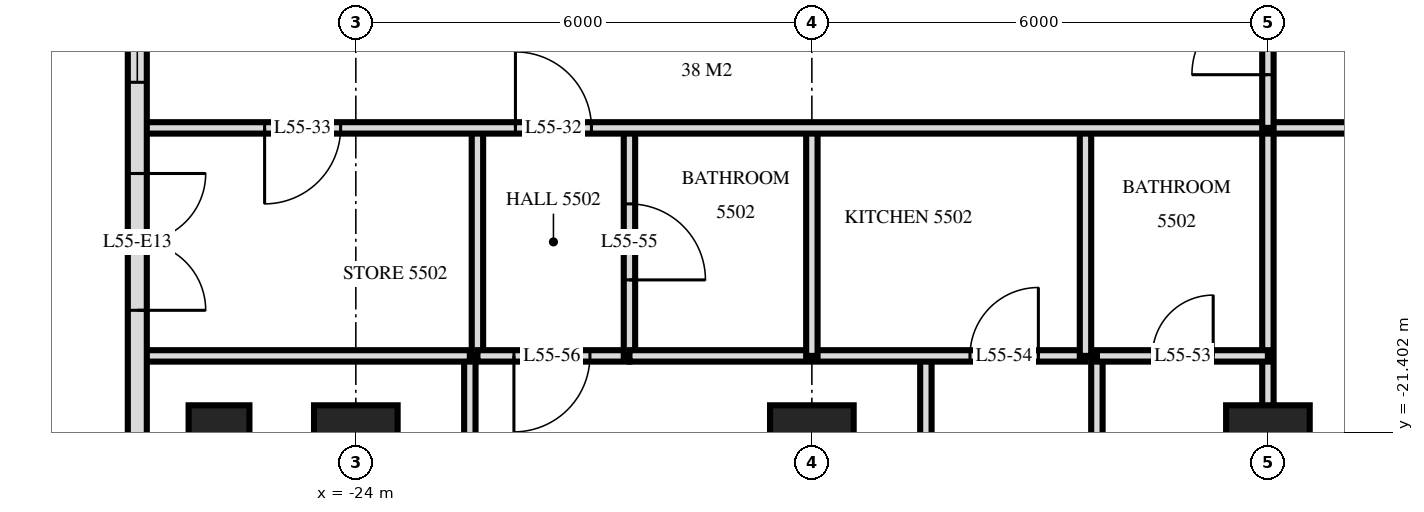
"""IFC4 building model, lengths in metres.
Left out: names, types, materials, properties, quantities, classifications, styles, units other than length and angle.
Written with IfcOpenShell. Run it as: python <this file> out.ifc"""

import sys

from ifc_helpers import new_model, si_unit, direction, frame, frame_2d, origin, origin_2d, place, context, subcontext, project, spatial, rectangle, extrude, element, fill, save


model = new_model("IFC4")
c1 = context("Model", 3, precision=1e-05, world=origin(), true_north=direction((0.0, 1.0)))
c2 = subcontext(c1, "Body", "Model", "MODEL_VIEW")
j1 = project(units=[si_unit("LENGTHUNIT", "METRE"), si_unit("PLANEANGLEUNIT", "RADIAN")], contexts=[c1])
p1 = place(None, origin())
s1 = spatial("IfcSite", under=j1, at=p1, CompositionType="ELEMENT")
p2 = place(p1, origin())
s2 = spatial("IfcBuilding", under=s1, at=p2, CompositionType="ELEMENT")
p3 = place(p2, frame((0.0, 0.0, 211.6)))
s3 = spatial("IfcBuildingStorey", under=s2, at=p3, CompositionType="ELEMENT", Elevation=211.6)
p4 = place(p3, frame((-25.8, -21.6, 0.0), z_axis=(0.0, 0.0, 1.0), x_axis=(0.0, 1.0, 0.0)))
e1 = element("IfcColumn", 1, at=p4, inside=s3, PredefinedType="COLUMN", context=c2, shape_type="SweptSolid", body=[
    extrude(rectangle(XDim=1.1, YDim=0.8, at=origin_2d()), origin(), (0.0, 0.0, 1.0), 3.5),
])
for number, where, z_axis, x_axis in (
    (2, (-24.0, -21.6, 0.0), (0.0, 0.0, 1.0), (1.0, 0.0, 0.0)),
    (3, (-18.0, -21.6, 0.0), (0.0, 0.0, 1.0), (1.0, 0.0, 0.0)),
    (4, (-12.0, -21.6, 0.0), (0.0, 0.0, 1.0), (1.0, 0.0, 0.0)),
):
    element("IfcColumn", number, at=place(p3, frame(where, z_axis=z_axis, x_axis=x_axis)), inside=s3, PredefinedType="COLUMN", context=c2, shape_type="SweptSolid", body=[
        extrude(rectangle(XDim=1.1, YDim=1.1, at=origin_2d()), origin(), (0.0, 0.0, 1.0), 3.5),
    ])
p5 = place(p3, frame((-26.875, -3.325, 0.0), z_axis=(0.0, 0.0, 1.0), x_axis=(0.0, -1.0, 0.0)))
e5 = element("IfcWall", 5, at=p5, inside=s3, PredefinedType="SOLIDWALL", context=c2, shape_type="SweptSolid", body=[
    extrude(rectangle(XDim=21.551, YDim=0.25, at=frame_2d((10.775, 0.0))), origin(), (0.0, 0.0, 1.0), 3.22),
])
p6 = place(p5, frame((6.65, 0.0, 0.0)))
e6 = element("IfcOpeningElement", 6, at=p6, cuts=e5, PredefinedType="OPENING", context=c2, shape_type="SweptSolid", body=[
    extrude(rectangle(XDim=1.8, YDim=2.4, at=frame_2d((0.9, 1.2))), frame((0.0, 0.135, 0.0), z_axis=(0.0, -1.0, 0.0), x_axis=(1.0, 0.0, 0.0)), (0.0, 0.0, 1.0), 0.27),
])
p7 = place(p5, frame((12.275, 0.0, 0.9)))
e7 = element("IfcOpeningElement", 7, at=p7, cuts=e5, PredefinedType="OPENING", context=c2, shape_type="SweptSolid", body=[
    extrude(rectangle(XDim=1.2, YDim=1.5, at=frame_2d((0.6, 0.75))), frame((0.0, 0.135, 0.0), z_axis=(0.0, -1.0, 0.0), x_axis=(1.0, 0.0, 0.0)), (0.0, 0.0, 1.0), 0.27),
])
p8 = place(p5, frame((14.675, 0.0, 0.0)))
e8 = element("IfcOpeningElement", 8, at=p8, cuts=e5, PredefinedType="OPENING", context=c2, shape_type="SweptSolid", body=[
    extrude(rectangle(XDim=1.8, YDim=2.4, at=frame_2d((0.9, 1.2))), frame((0.0, 0.135, 0.0), z_axis=(0.0, -1.0, 0.0), x_axis=(1.0, 0.0, 0.0)), (0.0, 0.0, 1.0), 0.27),
])
p9 = place(p5, frame((18.875, 0.0, 0.0)))
e9 = element("IfcOpeningElement", 9, at=p9, cuts=e5, PredefinedType="OPENING", context=c2, shape_type="SweptSolid", body=[
    extrude(rectangle(XDim=1.8, YDim=2.4, at=frame_2d((0.9, 1.2))), frame((0.0, 0.135, 0.0), z_axis=(0.0, -1.0, 0.0), x_axis=(1.0, 0.0, 0.0)), (0.0, 0.0, 1.0), 0.27),
])
p10 = place(p3, frame((-12.0, -17.4, 0.0), z_axis=(0.0, 0.0, 1.0), x_axis=(0.0, 1.0, 0.0)))
e10 = element("IfcWall", 10, at=p10, inside=s3, PredefinedType="PARTITIONING", context=c2, shape_type="SweptSolid", body=[
    extrude(rectangle(XDim=2.35, YDim=0.15, at=frame_2d((1.175, 0.0))), origin(), (0.0, 0.0, 1.0), 3.22),
])
p11 = place(p10, frame((0.7, 0.0, 0.0)))
e11 = element("IfcOpeningElement", 11, at=p11, cuts=e10, PredefinedType="OPENING", context=c2, shape_type="SweptSolid", body=[
    extrude(rectangle(XDim=1.0, YDim=2.1, at=frame_2d((0.5, 1.05))), frame((0.0, 0.085, 0.0), z_axis=(0.0, -1.0, 0.0), x_axis=(1.0, 0.0, 0.0)), (0.0, 0.0, 1.0), 0.17),
])
p12 = place(p3, frame((-12.0, -29.22, 0.0), z_axis=(0.0, 0.0, 1.0), x_axis=(0.0, 1.0, 0.0)))
e12 = element("IfcWall", 12, at=p12, inside=s3, PredefinedType="PARTITIONING", context=c2, shape_type="SweptSolid", body=[
    extrude(rectangle(XDim=11.82, YDim=0.15, at=frame_2d((5.91, 0.0))), origin(), (0.0, 0.0, 1.0), 3.22),
])
p13 = place(p3, frame((-14.25, -29.22, 0.0), z_axis=(0.0, 0.0, 1.0), x_axis=(0.0, 1.0, 0.0)))
e13 = element("IfcWall", 13, at=p13, inside=s3, PredefinedType="PARTITIONING", context=c2, shape_type="SweptSolid", body=[
    extrude(rectangle(XDim=8.82, YDim=0.15, at=frame_2d((4.41, 0.0))), origin(), (0.0, 0.0, 1.0), 3.22),
])
p14 = place(p13, frame((3.87, 0.0, 0.0)))
e14 = element("IfcOpeningElement", 14, at=p14, cuts=e13, PredefinedType="OPENING", context=c2, shape_type="SweptSolid", body=[
    extrude(rectangle(XDim=0.9, YDim=2.1, at=frame_2d((0.45, 1.05))), frame((0.0, 0.085, 0.0), z_axis=(0.0, -1.0, 0.0), x_axis=(1.0, 0.0, 0.0)), (0.0, 0.0, 1.0), 0.17),
])
p15 = place(p3, frame((-14.4, -20.4, 0.0), z_axis=(0.0, 0.0, 1.0), x_axis=(0.0, 1.0, 0.0)))
e15 = element("IfcWall", 15, at=p15, inside=s3, PredefinedType="PARTITIONING", context=c2, shape_type="SweptSolid", body=[
    extrude(rectangle(XDim=3.0, YDim=0.15, at=frame_2d((1.5, 0.0))), origin(), (0.0, 0.0, 1.0), 3.22),
])
p16 = place(p3, frame((-16.5, -29.22, 0.0), z_axis=(0.0, 0.0, 1.0), x_axis=(0.0, 1.0, 0.0)))
e16 = element("IfcWall", 16, at=p16, inside=s3, PredefinedType="PARTITIONING", context=c2, shape_type="SweptSolid", body=[
    extrude(rectangle(XDim=8.82, YDim=0.15, at=frame_2d((4.41, 0.0))), origin(), (0.0, 0.0, 1.0), 3.22),
])
p17 = place(p16, frame((3.85, 0.0, 0.0)))
e17 = element("IfcOpeningElement", 17, at=p17, cuts=e16, PredefinedType="OPENING", context=c2, shape_type="SweptSolid", body=[
    extrude(rectangle(XDim=0.9, YDim=2.1, at=frame_2d((0.45, 1.05))), frame((0.0, 0.085, 0.0), z_axis=(0.0, -1.0, 0.0), x_axis=(1.0, 0.0, 0.0)), (0.0, 0.0, 1.0), 0.17),
])
p18 = place(p3, frame((-18.0, -20.4, 0.0), z_axis=(0.0, 0.0, 1.0), x_axis=(0.0, 1.0, 0.0)))
e18 = element("IfcWall", 18, at=p18, inside=s3, PredefinedType="PARTITIONING", context=c2, shape_type="SweptSolid", body=[
    extrude(rectangle(XDim=3.0, YDim=0.15, at=frame_2d((1.5, 0.0))), origin(), (0.0, 0.0, 1.0), 3.22),
])
p19 = place(p3, frame((-20.4, -20.4, 0.0), z_axis=(0.0, 0.0, 1.0), x_axis=(0.0, 1.0, 0.0)))
e19 = element("IfcWall", 19, at=p19, inside=s3, PredefinedType="PARTITIONING", context=c2, shape_type="SweptSolid", body=[
    extrude(rectangle(XDim=3.0, YDim=0.15, at=frame_2d((1.5, 0.0))), origin(), (0.0, 0.0, 1.0), 3.22),
])
p20 = place(p19, frame((1.0, 0.0, 0.0)))
e20 = element("IfcOpeningElement", 20, at=p20, cuts=e19, PredefinedType="OPENING", context=c2, shape_type="SweptSolid", body=[
    extrude(rectangle(XDim=1.0, YDim=2.1, at=frame_2d((0.5, 1.05))), frame((0.0, 0.085, 0.0), z_axis=(0.0, -1.0, 0.0), x_axis=(1.0, 0.0, 0.0)), (0.0, 0.0, 1.0), 0.17),
])
p21 = place(p3, frame((-22.4, -20.4, 0.0), z_axis=(0.0, 0.0, 1.0), x_axis=(0.0, 1.0, 0.0)))
e21 = element("IfcWall", 21, at=p21, inside=s3, PredefinedType="PARTITIONING", context=c2, shape_type="SweptSolid", body=[
    extrude(rectangle(XDim=3.0, YDim=0.15, at=frame_2d((1.5, 0.0))), origin(), (0.0, 0.0, 1.0), 3.22),
])
p22 = place(p3, frame((-22.5, -29.217, 0.0), z_axis=(0.0, 0.0, 1.0), x_axis=(0.0, 1.0, 0.0)))
e22 = element("IfcWall", 22, at=p22, inside=s3, PredefinedType="PARTITIONING", context=c2, shape_type="SweptSolid", body=[
    extrude(rectangle(XDim=8.817, YDim=0.15, at=frame_2d((4.408, 0.0))), origin(), (0.0, 0.0, 1.0), 3.22),
])
p23 = place(p22, frame((3.886, 0.0, 0.0)))
e23 = element("IfcOpeningElement", 23, at=p23, cuts=e22, PredefinedType="OPENING", context=c2, shape_type="SweptSolid", body=[
    extrude(rectangle(XDim=0.9, YDim=2.1, at=frame_2d((0.45, 1.05))), frame((0.0, 0.085, 0.0), z_axis=(0.0, -1.0, 0.0), x_axis=(1.0, 0.0, 0.0)), (0.0, 0.0, 1.0), 0.17),
])
p24 = place(p3, frame((-22.4, -20.4, 0.0), z_axis=(0.0, 0.0, 1.0), x_axis=(1.0, 0.0, 0.0)))
e24 = element("IfcWall", 24, at=p24, inside=s3, PredefinedType="PARTITIONING", context=c2, shape_type="SweptSolid", body=[
    extrude(rectangle(XDim=2.0, YDim=0.15, at=frame_2d((1.0, 0.0))), origin(), (0.0, 0.0, 1.0), 3.22),
])
p25 = place(p24, frame((0.48, 0.0, 0.0)))
e25 = element("IfcOpeningElement", 25, at=p25, cuts=e24, PredefinedType="OPENING", context=c2, shape_type="SweptSolid", body=[
    extrude(rectangle(XDim=1.0, YDim=2.1, at=frame_2d((0.5, 1.05))), frame((0.0, 0.085, 0.0), z_axis=(0.0, -1.0, 0.0), x_axis=(1.0, 0.0, 0.0)), (0.0, 0.0, 1.0), 0.17),
])
p26 = place(p3, frame((-26.82, -20.4, 0.0), z_axis=(0.0, 0.0, 1.0), x_axis=(1.0, 0.0, 0.0)))
e26 = element("IfcWall", 26, at=p26, inside=s3, PredefinedType="PARTITIONING", context=c2, shape_type="SweptSolid", body=[
    extrude(rectangle(XDim=4.32, YDim=0.15, at=frame_2d((2.16, 0.0))), origin(), (0.0, 0.0, 1.0), 3.22),
])
p27 = place(p3, frame((-20.4, -20.4, 0.0), z_axis=(0.0, 0.0, 1.0), x_axis=(1.0, 0.0, 0.0)))
e27 = element("IfcWall", 27, at=p27, inside=s3, PredefinedType="PARTITIONING", context=c2, shape_type="SweptSolid", body=[
    extrude(rectangle(XDim=6.0, YDim=0.15, at=frame_2d((3.0, 0.0))), origin(), (0.0, 0.0, 1.0), 3.22),
])
p28 = place(p27, frame((4.48, 0.0, 0.0)))
e28 = element("IfcOpeningElement", 28, at=p28, cuts=e27, PredefinedType="OPENING", context=c2, shape_type="SweptSolid", body=[
    extrude(rectangle(XDim=0.9, YDim=2.1, at=frame_2d((0.45, 1.05))), frame((0.0, 0.085, 0.0), z_axis=(0.0, -1.0, 0.0), x_axis=(1.0, 0.0, 0.0)), (0.0, 0.0, 1.0), 0.17),
])
p29 = place(p3, frame((-14.25, -20.4, 0.0), z_axis=(0.0, 0.0, 1.0), x_axis=(1.0, 0.0, 0.0)))
e29 = element("IfcWall", 29, at=p29, inside=s3, PredefinedType="PARTITIONING", context=c2, shape_type="SweptSolid", body=[
    extrude(rectangle(XDim=2.25, YDim=0.15, at=frame_2d((1.125, 0.0))), origin(), (0.0, 0.0, 1.0), 3.22),
])
p30 = place(p29, frame((0.73, 0.0, 0.0)))
e30 = element("IfcOpeningElement", 30, at=p30, cuts=e29, PredefinedType="OPENING", context=c2, shape_type="SweptSolid", body=[
    extrude(rectangle(XDim=0.8, YDim=2.1, at=frame_2d((0.4, 1.05))), frame((0.0, 0.085, 0.0), z_axis=(0.0, -1.0, 0.0), x_axis=(1.0, 0.0, 0.0)), (0.0, 0.0, 1.0), 0.17),
])
p31 = place(p3, frame((-26.82, -17.4, 0.0), z_axis=(0.0, 0.0, 1.0), x_axis=(1.0, 0.0, 0.0)))
e31 = element("IfcWall", 31, at=p31, inside=s3, PredefinedType="PARTITIONING", context=c2, shape_type="SweptSolid", body=[
    extrude(rectangle(XDim=53.64, YDim=0.15, at=frame_2d((26.82, 0.0))), origin(), (0.0, 0.0, 1.0), 3.22),
])
p32 = place(p31, frame((4.92, 0.0, 0.0)))
e32 = element("IfcOpeningElement", 32, at=p32, cuts=e31, PredefinedType="OPENING", context=c2, shape_type="SweptSolid", body=[
    extrude(rectangle(XDim=1.0, YDim=2.1, at=frame_2d((0.5, 1.05))), frame((0.0, 0.085, 0.0), z_axis=(0.0, -1.0, 0.0), x_axis=(1.0, 0.0, 0.0)), (0.0, 0.0, 1.0), 0.17),
])
p33 = place(p31, frame((1.62, 0.0, 0.0)))
e33 = element("IfcOpeningElement", 33, at=p33, cuts=e31, PredefinedType="OPENING", context=c2, shape_type="SweptSolid", body=[
    extrude(rectangle(XDim=1.0, YDim=2.1, at=frame_2d((0.5, 1.05))), frame((0.0, 0.085, 0.0), z_axis=(0.0, -1.0, 0.0), x_axis=(1.0, 0.0, 0.0)), (0.0, 0.0, 1.0), 0.17),
])
p34 = place(p31, frame((41.17, 0.0, 0.0)))
e34 = element("IfcOpeningElement", 34, at=p34, cuts=e31, PredefinedType="OPENING", context=c2, shape_type="SweptSolid", body=[
    extrude(rectangle(XDim=1.0, YDim=2.1, at=frame_2d((0.5, 1.05))), frame((0.0, 0.085, 0.0), z_axis=(0.0, -1.0, 0.0), x_axis=(1.0, 0.0, 0.0)), (0.0, 0.0, 1.0), 0.17),
])
p35 = place(p31, frame((49.42, 0.0, 0.0)))
e35 = element("IfcOpeningElement", 35, at=p35, cuts=e31, PredefinedType="OPENING", context=c2, shape_type="SweptSolid", body=[
    extrude(rectangle(XDim=1.0, YDim=2.1, at=frame_2d((0.5, 1.05))), frame((0.0, 0.085, 0.0), z_axis=(0.0, -1.0, 0.0), x_axis=(1.0, 0.0, 0.0)), (0.0, 0.0, 1.0), 0.17),
])
p36 = place(p31, frame((47.62, 0.0, 0.0)))
e36 = element("IfcOpeningElement", 36, at=p36, cuts=e31, PredefinedType="OPENING", context=c2, shape_type="SweptSolid", body=[
    extrude(rectangle(XDim=1.0, YDim=2.1, at=frame_2d((0.5, 1.05))), frame((0.0, 0.085, 0.0), z_axis=(0.0, -1.0, 0.0), x_axis=(1.0, 0.0, 0.0)), (0.0, 0.0, 1.0), 0.17),
])
p37 = place(p31, frame((21.82, 0.0, 0.0)))
e37 = element("IfcOpeningElement", 37, at=p37, cuts=e31, PredefinedType="OPENING", context=c2, shape_type="SweptSolid", body=[
    extrude(rectangle(XDim=1.0, YDim=2.1, at=frame_2d((0.5, 1.05))), frame((0.0, 0.085, 0.0), z_axis=(0.0, -1.0, 0.0), x_axis=(1.0, 0.0, 0.0)), (0.0, 0.0, 1.0), 0.17),
])
p38 = place(p31, frame((33.82, 0.0, 0.0)))
e38 = element("IfcOpeningElement", 38, at=p38, cuts=e31, PredefinedType="OPENING", context=c2, shape_type="SweptSolid", body=[
    extrude(rectangle(XDim=1.0, YDim=2.1, at=frame_2d((0.5, 1.05))), frame((0.0, 0.085, 0.0), z_axis=(0.0, -1.0, 0.0), x_axis=(1.0, 0.0, 0.0)), (0.0, 0.0, 1.0), 0.17),
])
p39 = place(p7, origin())
e39 = element("IfcWindow", 39, at=p39, inside=s3, PartitioningType="SINGLE_PANEL", PredefinedType="WINDOW", context=c2, shape_type="SweptSolid", body=[
    extrude(rectangle(XDim=1.2, YDim=1.5, at=frame_2d((0.6, 0.75))), frame((0.0, 0.03, 0.0), z_axis=(0.0, -1.0, 0.0), x_axis=(1.0, 0.0, 0.0)), (0.0, 0.0, 1.0), 0.06),
])
fill(e7, e39)
p40 = place(p8, origin())
e40 = element("IfcDoor", 40, at=p40, inside=s3, OperationType="DOUBLE_DOOR_SINGLE_SWING", PredefinedType="DOOR", context=c2, shape_type="SweptSolid", body=[
    extrude(rectangle(XDim=1.8, YDim=2.4, at=frame_2d((0.9, 1.2))), frame((0.0, 0.025, 0.0), z_axis=(0.0, -1.0, 0.0), x_axis=(1.0, 0.0, 0.0)), (0.0, 0.0, 1.0), 0.05),
])
fill(e8, e40)
p41 = place(p11, origin())
e41 = element("IfcDoor", 41, at=p41, inside=s3, OperationType="SINGLE_SWING_RIGHT", PredefinedType="DOOR", context=c2, shape_type="SweptSolid", body=[
    extrude(rectangle(XDim=1.0, YDim=2.1, at=frame_2d((0.5, 1.05))), frame((0.0, 0.025, 0.0), z_axis=(0.0, -1.0, 0.0), x_axis=(1.0, 0.0, 0.0)), (0.0, 0.0, 1.0), 0.05),
])
fill(e11, e41)
p42 = place(p32, origin())
e42 = element("IfcDoor", 42, at=p42, inside=s3, OperationType="SINGLE_SWING_RIGHT", PredefinedType="DOOR", context=c2, shape_type="SweptSolid", body=[
    extrude(rectangle(XDim=1.0, YDim=2.1, at=frame_2d((0.5, 1.05))), frame((0.0, 0.025, 0.0), z_axis=(0.0, -1.0, 0.0), x_axis=(1.0, 0.0, 0.0)), (0.0, 0.0, 1.0), 0.05),
])
fill(e32, e42)
p43 = place(p33, frame((0.5, 0.0, 0.0), z_axis=(0.0, 0.0, 1.0), x_axis=(-1.0, 0.0, 0.0)))
e43 = element("IfcDoor", 43, at=p43, inside=s3, OperationType="SINGLE_SWING_LEFT", PredefinedType="DOOR", context=c2, shape_type="SweptSolid", body=[
    extrude(rectangle(XDim=1.0, YDim=2.1, at=frame_2d((0.0, 1.05))), frame((0.0, -0.025, 0.0), z_axis=(0.0, 1.0, 0.0), x_axis=(-1.0, 0.0, 0.0)), (0.0, 0.0, 1.0), 0.05),
])
fill(e33, e43)
p44 = place(p30, origin())
e44 = element("IfcDoor", 44, at=p44, inside=s3, OperationType="SINGLE_SWING_LEFT", PredefinedType="DOOR", context=c2, shape_type="SweptSolid", body=[
    extrude(rectangle(XDim=0.8, YDim=2.1, at=frame_2d((0.4, 1.05))), frame((0.0, 0.025, 0.0), z_axis=(0.0, -1.0, 0.0), x_axis=(1.0, 0.0, 0.0)), (0.0, 0.0, 1.0), 0.05),
])
fill(e30, e44)
p45 = place(p28, origin())
e45 = element("IfcDoor", 45, at=p45, inside=s3, OperationType="SINGLE_SWING_LEFT", PredefinedType="DOOR", context=c2, shape_type="SweptSolid", body=[
    extrude(rectangle(XDim=0.9, YDim=2.1, at=frame_2d((0.45, 1.05))), frame((0.0, 0.025, 0.0), z_axis=(0.0, -1.0, 0.0), x_axis=(1.0, 0.0, 0.0)), (0.0, 0.0, 1.0), 0.05),
])
fill(e28, e45)
p46 = place(p20, frame((0.5, 0.0, 0.0), z_axis=(0.0, 0.0, 1.0), x_axis=(-1.0, 0.0, 0.0)))
e46 = element("IfcDoor", 46, at=p46, inside=s3, OperationType="SINGLE_SWING_LEFT", PredefinedType="DOOR", context=c2, shape_type="SweptSolid", body=[
    extrude(rectangle(XDim=1.0, YDim=2.1, at=frame_2d((0.0, 1.05))), frame((0.0, -0.025, 0.0), z_axis=(0.0, 1.0, 0.0), x_axis=(-1.0, 0.0, 0.0)), (0.0, 0.0, 1.0), 0.05),
])
fill(e20, e46)
p47 = place(p25, frame((0.5, 0.0, 0.0), z_axis=(0.0, 0.0, 1.0), x_axis=(-1.0, 0.0, 0.0)))
e47 = element("IfcDoor", 47, at=p47, inside=s3, OperationType="SINGLE_SWING_LEFT", PredefinedType="DOOR", context=c2, shape_type="SweptSolid", body=[
    extrude(rectangle(XDim=1.0, YDim=2.1, at=frame_2d((0.0, 1.05))), frame((0.0, -0.025, 0.0), z_axis=(0.0, 1.0, 0.0), x_axis=(-1.0, 0.0, 0.0)), (0.0, 0.0, 1.0), 0.05),
])
fill(e25, e47)
save(model, sys.argv[1])
